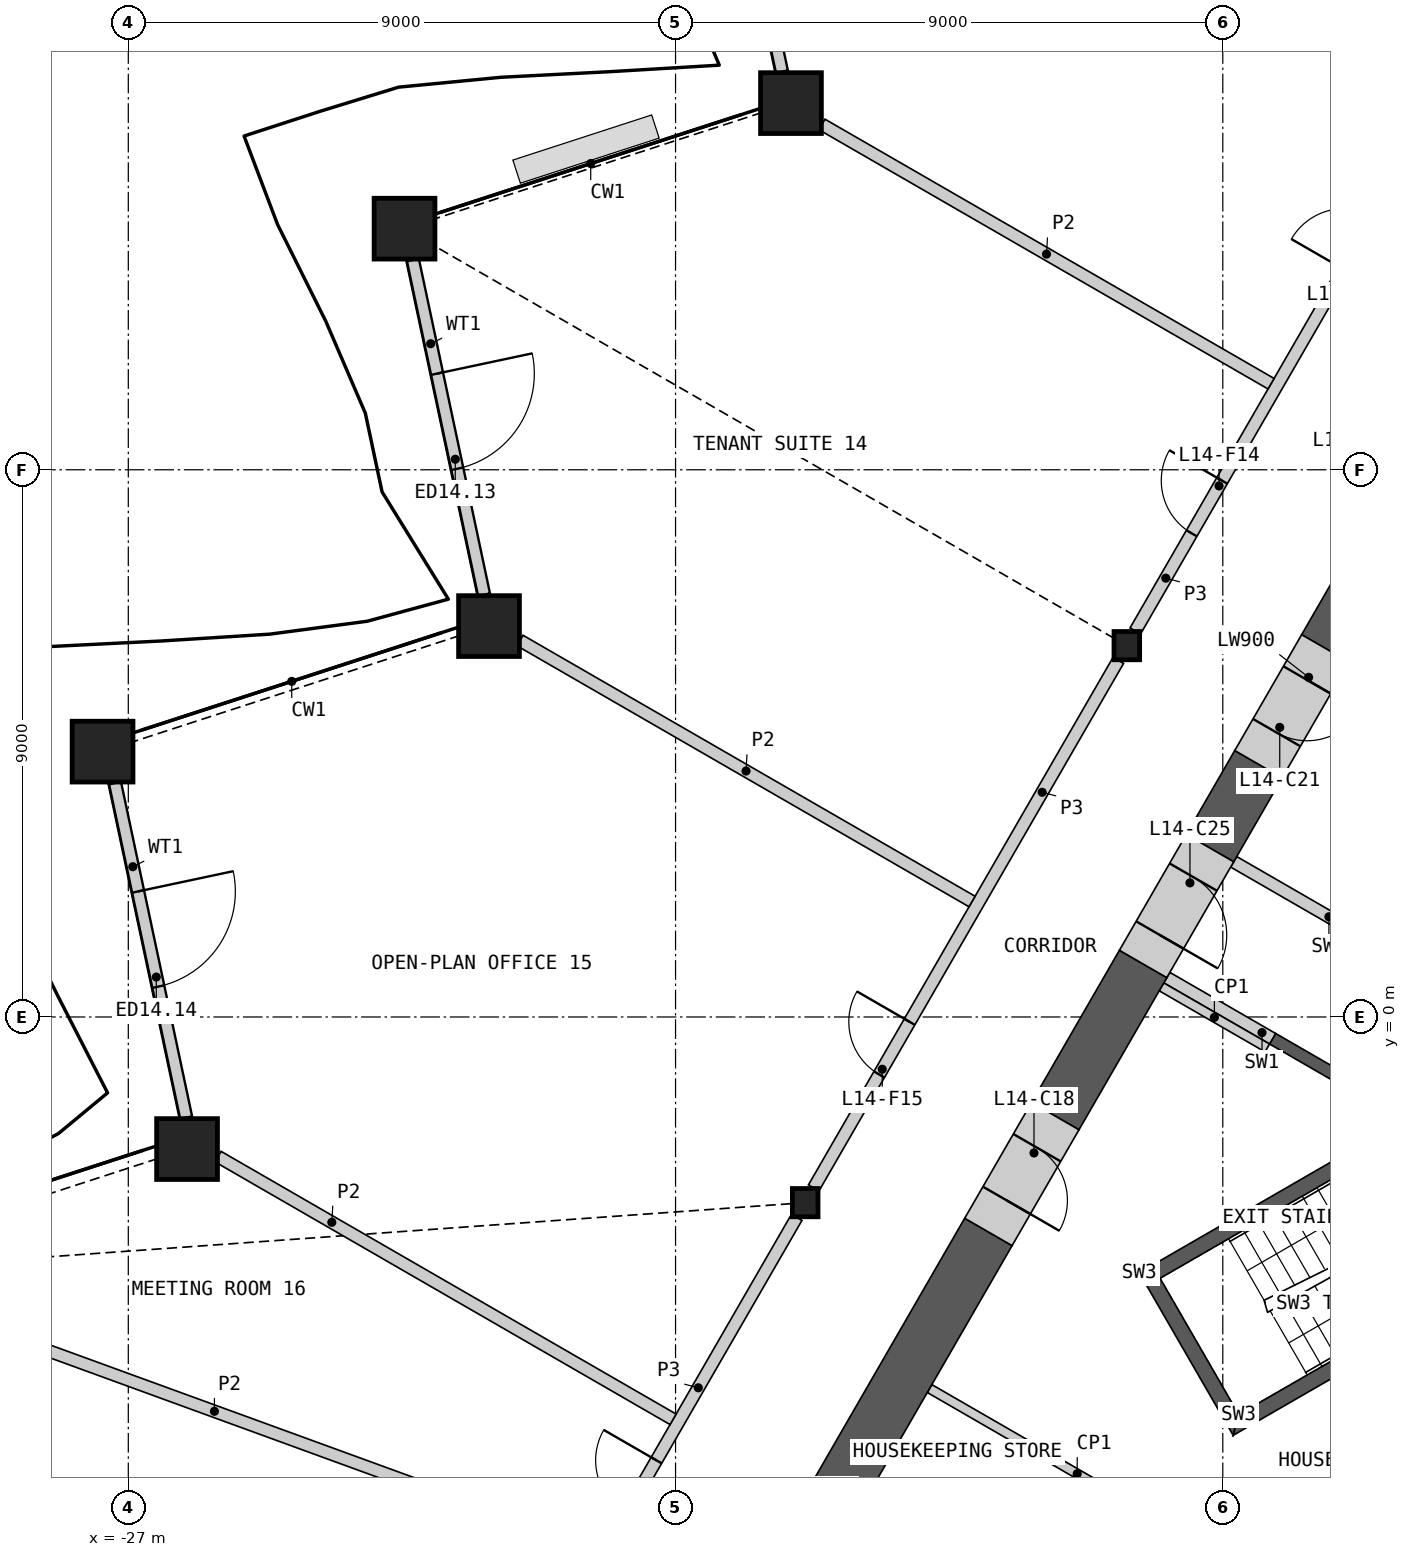
"""IFC4 building model, lengths in metres.
Left out: names, types, materials, properties, quantities, classifications, styles, units other than length and angle.
Written with IfcOpenShell. Run it as: python <this file> out.ifc"""

import sys

from ifc_helpers import new_model, si_unit, direction, frame, frame_2d, origin, origin_2d, place, context, subcontext, project, spatial, polyline, rectangle, hollow_rectangle, i_section, outline, extrude, element, fill, save


model = new_model("IFC4")
c1 = context("Model", 3, precision=1e-05, world=origin(), true_north=direction((0.0, 1.0)))
c2 = subcontext(c1, "Body", "Model", "MODEL_VIEW")
j1 = project(units=[si_unit("LENGTHUNIT", "METRE"), si_unit("PLANEANGLEUNIT", "RADIAN")], contexts=[c1])
p1 = place(None, origin())
s1 = spatial("IfcSite", under=j1, at=p1, CompositionType="ELEMENT")
p2 = place(p1, origin())
s2 = spatial("IfcBuilding", under=s1, at=p2, CompositionType="ELEMENT")
p3 = place(p2, frame((0.0, 0.0, 67.8)))
s3 = spatial("IfcBuildingStorey", under=s2, at=p3, CompositionType="ELEMENT", Elevation=67.8)
for number, where, z_axis, x_axis in (
    (1, (-16.102, 15.031, 0.0), (0.0, 0.0, 1.0), (1.0, 0.0, 0.0)),
    (2, (-22.457, 12.966, 0.0), (0.0, 0.0, 1.0), (1.0, 0.0, 0.0)),
    (3, (-21.068, 6.429, 0.0), (0.0, 0.0, 1.0), (1.0, 0.0, 0.0)),
    (4, (-27.423, 4.364, 0.0), (0.0, 0.0, 1.0), (1.0, 0.0, 0.0)),
    (5, (-26.034, -2.172, 0.0), (0.0, 0.0, 1.0), (1.0, 0.0, 0.0)),
):
    element("IfcColumn", number, at=place(p3, frame(where, z_axis=z_axis, x_axis=x_axis)), inside=s3, PredefinedType="COLUMN", context=c2, shape_type="SweptSolid", body=[
        extrude(hollow_rectangle(XDim=1.0, YDim=1.0, WallThickness=0.07, at=origin_2d()), origin(), (0.0, 0.0, 1.0), 4.2),
    ])
for number, where, z_axis, x_axis in (
    (6, (-10.578, 6.107, 0.0), (0.0, 0.0, 1.0), (1.0, 0.0, 0.0)),
    (7, (-15.868, -3.054, 0.0), (0.0, 0.0, 1.0), (1.0, 0.0, 0.0)),
):
    element("IfcColumn", number, at=place(p3, frame(where, z_axis=z_axis, x_axis=x_axis)), inside=s3, PredefinedType="COLUMN", context=c2, shape_type="SweptSolid", body=[
        extrude(i_section(OverallWidth=0.421, OverallDepth=0.465, WebThickness=0.045, FlangeThickness=0.072, at=origin_2d()), origin(), (0.0, 0.0, 1.0), 4.2),
    ])
p4 = place(p3, frame((-17.42, 21.051, 0.0), z_axis=(0.0, 0.0, 1.0), x_axis=(0.207901831982, -0.978149696242, 0.0)))
e8 = element("IfcWall", 8, at=p4, inside=s3, PredefinedType="SOLIDWALL", context=c2, shape_type="SweptSolid", body=[
    extrude(rectangle(XDim=5.626, YDim=0.2, at=frame_2d((2.813, 0.0))), origin(), (0.0, 0.0, 1.0), 3.189),
])
p5 = place(p4, frame((1.996, 0.0, 0.0)))
e9 = element("IfcOpeningElement", 9, at=p5, cuts=e8, PredefinedType="OPENING", context=c2, shape_type="SweptSolid", body=[
    extrude(rectangle(XDim=1.6, YDim=2.4, at=frame_2d((0.8, 1.2))), frame((0.0, 0.11, 0.0), z_axis=(0.0, -1.0, 0.0), x_axis=(1.0, 0.0, 0.0)), (0.0, 0.0, 1.0), 0.22),
])
p6 = place(p3, frame((-22.319, 12.449, 0.0), z_axis=(0.0, 0.0, 1.0), x_axis=(0.207901831982, -0.978149696242, 0.0)))
e10 = element("IfcWall", 10, at=p6, inside=s3, PredefinedType="SOLIDWALL", context=c2, shape_type="SweptSolid", body=[
    extrude(rectangle(XDim=5.626, YDim=0.2, at=frame_2d((2.813, 0.0))), origin(), (0.0, 0.0, 1.0), 3.189),
])
p7 = place(p6, frame((1.909, 0.0, 0.0)))
e11 = element("IfcOpeningElement", 11, at=p7, cuts=e10, PredefinedType="OPENING", context=c2, shape_type="SweptSolid", body=[
    extrude(rectangle(XDim=1.6, YDim=2.4, at=frame_2d((0.8, 1.2))), frame((0.0, 0.11, 0.0), z_axis=(0.0, -1.0, 0.0), x_axis=(1.0, 0.0, 0.0)), (0.0, 0.0, 1.0), 0.22),
])
p8 = place(p3, frame((-27.218, 3.848, 0.0), z_axis=(0.0, 0.0, 1.0), x_axis=(0.207943350029, -0.978140870825, 0.0)))
e12 = element("IfcWall", 12, at=p8, inside=s3, PredefinedType="SOLIDWALL", context=c2, shape_type="SweptSolid", body=[
    extrude(rectangle(XDim=5.626, YDim=0.2, at=frame_2d((2.813, 0.0))), origin(), (0.0, 0.0, 1.0), 3.189),
])
p9 = place(p8, frame((1.822, 0.0, 0.0)))
e13 = element("IfcOpeningElement", 13, at=p9, cuts=e12, PredefinedType="OPENING", context=c2, shape_type="SweptSolid", body=[
    extrude(rectangle(XDim=1.6, YDim=2.4, at=frame_2d((0.8, 1.2))), frame((0.0, 0.11, 0.0), z_axis=(0.0, -1.0, 0.0), x_axis=(1.0, 0.0, 0.0)), (0.0, 0.0, 1.0), 0.22),
])
p10 = place(p3, origin())
e14 = element("IfcWall", 14, at=p10, inside=s3, PredefinedType="SHEAR", context=c2, shape_type="SweptSolid", body=[
    extrude(outline(polyline([(-6.061, -1.697), (-8.231, -0.444), (-8.131, -0.271), (-5.96, -1.524), (-6.061, -1.697)])), origin(), (0.0, 0.0, 1.0), 3.8),
])
p11 = place(p3, frame((-7.081, 1.548, 0.0), z_axis=(0.0, 0.0, 1.0), x_axis=(-0.865983199114, 0.50007309351, 0.0)))
e15 = element("IfcWall", 15, at=p11, inside=s3, PredefinedType="SHEAR", context=c2, shape_type="SweptSolid", body=[
    extrude(rectangle(XDim=2.009, YDim=0.2, at=frame_2d((1.004, 0.0))), origin(), (0.0, 0.0, 1.0), 3.8),
])
p12 = place(p3, frame((-8.181, -0.357, 0.0), z_axis=(0.0, 0.0, 1.0), x_axis=(-0.866035824272, 0.499981950752, 0.0)))
e16 = element("IfcWall", 16, at=p12, inside=s3, PredefinedType="SHEAR", context=c2, shape_type="SweptSolid", body=[
    extrude(rectangle(XDim=2.009, YDim=0.2, at=frame_2d((1.004, 0.0))), origin(), (0.0, 0.0, 1.0), 3.8),
])
p13 = place(p3, origin())
e17 = element("IfcWall", 17, at=p13, inside=s3, PredefinedType="SHEAR", context=c2, shape_type="SweptSolid", body=[
    extrude(outline(polyline([(-5.307, -1.281), (-10.374, -4.206), (-10.032, -4.298), (-5.182, -1.498), (-5.307, -1.281)])), origin(), (0.0, 0.0, 1.0), 3.8),
])
p14 = place(p3, origin())
e18 = element("IfcWall", 18, at=p14, inside=s3, PredefinedType="SHEAR", context=c2, shape_type="SweptSolid", body=[
    extrude(outline(polyline([(-10.374, -4.206), (-8.83, -6.881), (-8.738, -6.539), (-10.032, -4.298), (-10.374, -4.206)])), origin(), (0.0, 0.0, 1.0), 3.8),
])
p15 = place(p3, origin())
e19 = element("IfcWall", 19, at=p15, inside=s3, PredefinedType="SHEAR", context=c2, shape_type="SweptSolid", body=[
    extrude(outline(polyline([(-8.738, -6.539), (-8.83, -6.881), (-3.763, -3.956), (-3.888, -3.739), (-8.738, -6.539)])), origin(), (0.0, 0.0, 1.0), 3.8),
])
p16 = place(p3, frame((-8.268, -0.509, 0.0), z_axis=(0.0, 0.0, 1.0), x_axis=(-0.866035824272, 0.499981950752, 0.0)))
e20 = element("IfcWall", 20, at=p16, inside=s3, PredefinedType="PARTITIONING", context=c2, shape_type="SweptSolid", body=[
    extrude(rectangle(XDim=2.009, YDim=0.15, at=frame_2d((1.004, 0.0))), origin(), (0.0, 0.0, 1.0), 3.8),
])
p17 = place(p3, frame((-13.823, -6.111, 0.0), z_axis=(0.0, 0.0, 1.0), x_axis=(0.866026802741, -0.499997576928, 0.0)))
e21 = element("IfcWall", 21, at=p17, inside=s3, PredefinedType="PARTITIONING", context=c2, shape_type="SweptSolid", body=[
    extrude(rectangle(XDim=5.607, YDim=0.15, at=frame_2d((2.804, 0.0))), origin(), (0.0, 0.0, 1.0), 3.8),
])
p18 = place(p3, frame((-12.855, -3.536, 0.0), z_axis=(0.0, 0.0, 1.0), x_axis=(-0.499999419053, -0.866025739194, 0.0)))
e22 = element("IfcWall", 22, at=p18, inside=s3, PredefinedType="SHEAR", context=c2, shape_type="SweptSolid", body=[
    extrude(rectangle(XDim=5.952, YDim=0.9, at=frame_2d((2.976, 0.0))), origin(), (0.0, 0.0, 1.0), 3.8),
])
p19 = place(p3, frame((-10.31, 0.872, 0.0), z_axis=(0.0, 0.0, 1.0), x_axis=(-0.499946751862, -0.866056144429, 0.0)))
e23 = element("IfcWall", 23, at=p19, inside=s3, PredefinedType="SHEAR", context=c2, shape_type="SweptSolid", body=[
    extrude(rectangle(XDim=2.889, YDim=0.9, at=frame_2d((1.445, 0.0))), origin(), (0.0, 0.0, 1.0), 3.8),
])
p20 = place(p3, frame((-6.145, 8.086, 0.0), z_axis=(0.0, 0.0, 1.0), x_axis=(-0.500026924946, -0.866009858102, 0.0)))
e24 = element("IfcWall", 24, at=p20, inside=s3, PredefinedType="SHEAR", context=c2, shape_type="SweptSolid", body=[
    extrude(rectangle(XDim=2.337, YDim=0.9, at=frame_2d((1.168, 0.0))), origin(), (0.0, 0.0, 1.0), 3.8),
])
p21 = place(p3, frame((-8.413, 4.157, 0.0), z_axis=(0.0, 0.0, 1.0), x_axis=(-0.499961121316, -0.86604784924, 0.0)))
e25 = element("IfcWall", 25, at=p21, inside=s3, PredefinedType="SHEAR", context=c2, shape_type="SweptSolid", body=[
    extrude(rectangle(XDim=1.594, YDim=0.9, at=frame_2d((0.797, 0.0))), origin(), (0.0, 0.0, 1.0), 3.8),
])
p22 = place(p3, frame((-11.755, -1.63, 0.0), z_axis=(0.0, 0.0, 1.0), x_axis=(-0.50002983664, -0.866008176907, 0.0)))
e26 = element("IfcWall", 26, at=p22, inside=s3, PredefinedType="SHEAR", context=c2, shape_type="SweptSolid", body=[
    extrude(rectangle(XDim=2.2, YDim=0.9, at=frame_2d((1.1, 0.0))), origin(), (0.0, 0.0, 1.0), 3.8),
])
p23 = place(p22, frame((0.6, 0.0, 0.0)))
e27 = element("IfcOpeningElement", 27, at=p23, cuts=e26, PredefinedType="OPENING", context=c2, shape_type="SweptSolid", body=[
    extrude(rectangle(XDim=1.0, YDim=2.1, at=frame_2d((0.5, 1.05))), frame((0.0, 0.46, 0.0), z_axis=(0.0, -1.0, 0.0), x_axis=(1.0, 0.0, 0.0)), (0.0, 0.0, 1.0), 0.92),
])
p24 = place(p3, frame((-7.313, 6.062, 0.0), z_axis=(0.0, 0.0, 1.0), x_axis=(-0.500077893725, -0.86598042715, 0.0)))
e28 = element("IfcWall", 28, at=p24, inside=s3, PredefinedType="SHEAR", context=c2, shape_type="SweptSolid", body=[
    extrude(rectangle(XDim=2.2, YDim=0.9, at=frame_2d((1.1, 0.0))), origin(), (0.0, 0.0, 1.0), 3.8),
])
p25 = place(p24, frame((0.6, 0.0, 0.0)))
e29 = element("IfcOpeningElement", 29, at=p25, cuts=e28, PredefinedType="OPENING", context=c2, shape_type="SweptSolid", body=[
    extrude(rectangle(XDim=1.0, YDim=2.1, at=frame_2d((0.5, 1.05))), frame((0.0, 0.46, 0.0), z_axis=(0.0, -1.0, 0.0), x_axis=(1.0, 0.0, 0.0)), (0.0, 0.0, 1.0), 0.92),
])
p26 = place(p3, frame((-9.21, 2.777, 0.0), z_axis=(0.0, 0.0, 1.0), x_axis=(-0.500077893725, -0.86598042715, 0.0)))
e30 = element("IfcWall", 30, at=p26, inside=s3, PredefinedType="SHEAR", context=c2, shape_type="SweptSolid", body=[
    extrude(rectangle(XDim=2.2, YDim=0.9, at=frame_2d((1.1, 0.0))), origin(), (0.0, 0.0, 1.0), 3.8),
])
p27 = place(p26, frame((0.55, 0.0, 0.0)))
e31 = element("IfcOpeningElement", 31, at=p27, cuts=e30, PredefinedType="OPENING", context=c2, shape_type="SweptSolid", body=[
    extrude(rectangle(XDim=1.1, YDim=2.1, at=frame_2d((0.55, 1.05))), frame((0.0, 0.46, 0.0), z_axis=(0.0, -1.0, 0.0), x_axis=(1.0, 0.0, 0.0)), (0.0, 0.0, 1.0), 0.92),
])
p28 = place(p3, frame((-15.728, -2.811, 0.0), z_axis=(0.0, 0.0, 1.0), x_axis=(0.49999175339, 0.866030164915, 0.0)))
e32 = element("IfcWall", 32, at=p28, inside=s3, PredefinedType="PARTITIONING", context=c2, shape_type="SweptSolid", body=[
    extrude(rectangle(XDim=10.019, YDim=0.2, at=frame_2d((5.009, 0.0))), origin(), (0.0, 0.0, 1.0), 3.8),
])
p29 = place(p28, frame((2.154, 0.0, 0.0)))
e33 = element("IfcOpeningElement", 33, at=p29, cuts=e32, PredefinedType="OPENING", context=c2, shape_type="SweptSolid", body=[
    extrude(rectangle(XDim=1.0, YDim=2.1, at=frame_2d((0.5, 1.05))), frame((0.0, 0.11, 0.0), z_axis=(0.0, -1.0, 0.0), x_axis=(1.0, 0.0, 0.0)), (0.0, 0.0, 1.0), 0.22),
])
p30 = place(p3, frame((-10.439, 6.35, 0.0), z_axis=(0.0, 0.0, 1.0), x_axis=(0.50001002959, 0.86601961312, 0.0)))
e34 = element("IfcWall", 34, at=p30, inside=s3, PredefinedType="PARTITIONING", context=c2, shape_type="SweptSolid", body=[
    extrude(rectangle(XDim=10.019, YDim=0.2, at=frame_2d((5.009, 0.0))), origin(), (0.0, 0.0, 1.0), 3.8),
])
p31 = place(p30, frame((6.865, 0.0, 0.0)))
e35 = element("IfcOpeningElement", 35, at=p31, cuts=e34, PredefinedType="OPENING", context=c2, shape_type="SweptSolid", body=[
    extrude(rectangle(XDim=1.0, YDim=2.1, at=frame_2d((0.5, 1.05))), frame((0.0, 0.11, 0.0), z_axis=(0.0, -1.0, 0.0), x_axis=(1.0, 0.0, 0.0)), (0.0, 0.0, 1.0), 0.22),
])
p32 = place(p30, frame((1.854, 0.0, 0.0)))
e36 = element("IfcOpeningElement", 36, at=p32, cuts=e34, PredefinedType="OPENING", context=c2, shape_type="SweptSolid", body=[
    extrude(rectangle(XDim=1.0, YDim=2.1, at=frame_2d((0.5, 1.05))), frame((0.0, 0.11, 0.0), z_axis=(0.0, -1.0, 0.0), x_axis=(1.0, 0.0, 0.0)), (0.0, 0.0, 1.0), 0.22),
])
p33 = place(p3, frame((-19.244, -8.902, 0.0), z_axis=(0.0, 0.0, 1.0), x_axis=(0.499984737558, 0.86603421538, 0.0)))
e37 = element("IfcWall", 37, at=p33, inside=s3, PredefinedType="PARTITIONING", context=c2, shape_type="SweptSolid", body=[
    extrude(rectangle(XDim=6.473, YDim=0.2, at=frame_2d((3.236, 0.0))), origin(), (0.0, 0.0, 1.0), 3.8),
])
p34 = place(p33, frame((0.859, 0.0, 0.0)))
e38 = element("IfcOpeningElement", 38, at=p34, cuts=e37, PredefinedType="OPENING", context=c2, shape_type="SweptSolid", body=[
    extrude(rectangle(XDim=1.0, YDim=2.1, at=frame_2d((0.5, 1.05))), frame((0.0, 0.11, 0.0), z_axis=(0.0, -1.0, 0.0), x_axis=(1.0, 0.0, 0.0)), (0.0, 0.0, 1.0), 0.22),
])
p35 = place(p3, frame((-31.879, -4.19, 0.0), z_axis=(0.0, 0.0, 1.0), x_axis=(0.939515478087, -0.34250644729, 0.0)))
e39 = element("IfcWall", 39, at=p35, inside=s3, PredefinedType="PARTITIONING", context=c2, shape_type="SweptSolid", body=[
    extrude(rectangle(XDim=13.402, YDim=0.2, at=frame_2d((6.701, 0.0))), origin(), (0.0, 0.0, 1.0), 2.885),
])
p36 = place(p3, frame((-25.524, -2.297, 0.0), z_axis=(0.0, 0.0, 1.0), x_axis=(0.866036909293, -0.499980071345, 0.0)))
e40 = element("IfcWall", 40, at=p36, inside=s3, PredefinedType="PARTITIONING", context=c2, shape_type="SweptSolid", body=[
    extrude(rectangle(XDim=8.641, YDim=0.2, at=frame_2d((4.32, 0.0))), origin(), (0.0, 0.0, 1.0), 2.885),
])
p37 = place(p3, frame((-20.558, 6.191, 0.0), z_axis=(0.0, 0.0, 1.0), x_axis=(0.866024086673, -0.500002281298, 0.0)))
e41 = element("IfcWall", 41, at=p37, inside=s3, PredefinedType="PARTITIONING", context=c2, shape_type="SweptSolid", body=[
    extrude(rectangle(XDim=8.584, YDim=0.2, at=frame_2d((4.292, 0.0))), origin(), (0.0, 0.0, 1.0), 2.885),
])
p38 = place(p3, frame((-15.592, 14.68, 0.0), z_axis=(0.0, 0.0, 1.0), x_axis=(0.866023490266, -0.500003314297, 0.0)))
e42 = element("IfcWall", 42, at=p38, inside=s3, PredefinedType="PARTITIONING", context=c2, shape_type="SweptSolid", body=[
    extrude(rectangle(XDim=8.528, YDim=0.2, at=frame_2d((4.264, 0.0))), origin(), (0.0, 0.0, 1.0), 2.885),
])
p39 = place(p7, origin())
e43 = element("IfcDoor", 43, at=p39, inside=s3, OperationType="DOUBLE_DOOR_SINGLE_SWING", PredefinedType="DOOR", context=c2, shape_type="SweptSolid", body=[
    extrude(rectangle(XDim=1.6, YDim=2.4, at=frame_2d((0.8, 1.2))), frame((0.0, 0.025, 0.0), z_axis=(0.0, -1.0, 0.0), x_axis=(1.0, 0.0, 0.0)), (0.0, 0.0, 1.0), 0.05),
])
fill(e11, e43)
p40 = place(p9, origin())
e44 = element("IfcDoor", 44, at=p40, inside=s3, OperationType="DOUBLE_DOOR_SINGLE_SWING", PredefinedType="DOOR", context=c2, shape_type="SweptSolid", body=[
    extrude(rectangle(XDim=1.6, YDim=2.4, at=frame_2d((0.8, 1.2))), frame((0.0, 0.025, 0.0), z_axis=(0.0, -1.0, 0.0), x_axis=(1.0, 0.0, 0.0)), (0.0, 0.0, 1.0), 0.05),
])
fill(e13, e44)
p41 = place(p23, origin())
e45 = element("IfcDoor", 45, at=p41, inside=s3, OperationType="SINGLE_SWING_RIGHT", PredefinedType="DOOR", context=c2, shape_type="SweptSolid", body=[
    extrude(rectangle(XDim=1.0, YDim=2.1, at=frame_2d((0.5, 1.05))), frame((0.0, 0.205, 0.0), z_axis=(0.0, -1.0, 0.0), x_axis=(1.0, 0.0, 0.0)), (0.0, 0.0, 1.0), 0.05),
])
fill(e27, e45)
p42 = place(p25, origin())
e46 = element("IfcDoor", 46, at=p42, inside=s3, OperationType="SINGLE_SWING_LEFT", PredefinedType="DOOR", context=c2, shape_type="SweptSolid", body=[
    extrude(rectangle(XDim=1.0, YDim=2.1, at=frame_2d((0.5, 1.05))), frame((0.0, 0.205, 0.0), z_axis=(0.0, -1.0, 0.0), x_axis=(1.0, 0.0, 0.0)), (0.0, 0.0, 1.0), 0.05),
])
fill(e29, e46)
p43 = place(p27, origin())
e47 = element("IfcDoor", 47, at=p43, inside=s3, OperationType="SINGLE_SWING_RIGHT", PredefinedType="DOOR", context=c2, shape_type="SweptSolid", body=[
    extrude(rectangle(XDim=1.1, YDim=2.1, at=frame_2d((0.55, 1.05))), frame((0.0, 0.205, 0.0), z_axis=(0.0, -1.0, 0.0), x_axis=(1.0, 0.0, 0.0)), (0.0, 0.0, 1.0), 0.05),
])
fill(e31, e47)
p44 = place(p32, origin())
e48 = element("IfcDoor", 48, at=p44, inside=s3, OperationType="SINGLE_SWING_RIGHT", PredefinedType="DOOR", context=c2, shape_type="SweptSolid", body=[
    extrude(rectangle(XDim=1.0, YDim=2.1, at=frame_2d((0.5, 1.05))), frame((0.0, 0.025, 0.0), z_axis=(0.0, -1.0, 0.0), x_axis=(1.0, 0.0, 0.0)), (0.0, 0.0, 1.0), 0.05),
])
fill(e36, e48)
p45 = place(p29, origin())
e49 = element("IfcDoor", 49, at=p45, inside=s3, OperationType="SINGLE_SWING_RIGHT", PredefinedType="DOOR", context=c2, shape_type="SweptSolid", body=[
    extrude(rectangle(XDim=1.0, YDim=2.1, at=frame_2d((0.5, 1.05))), frame((0.0, 0.025, 0.0), z_axis=(0.0, -1.0, 0.0), x_axis=(1.0, 0.0, 0.0)), (0.0, 0.0, 1.0), 0.05),
])
fill(e33, e49)
p46 = place(p34, origin())
e50 = element("IfcDoor", 50, at=p46, inside=s3, OperationType="SINGLE_SWING_RIGHT", PredefinedType="DOOR", context=c2, shape_type="SweptSolid", body=[
    extrude(rectangle(XDim=1.0, YDim=2.1, at=frame_2d((0.5, 1.05))), frame((0.0, 0.025, 0.0), z_axis=(0.0, -1.0, 0.0), x_axis=(1.0, 0.0, 0.0)), (0.0, 0.0, 1.0), 0.05),
])
fill(e38, e50)
save(model, sys.argv[1])
